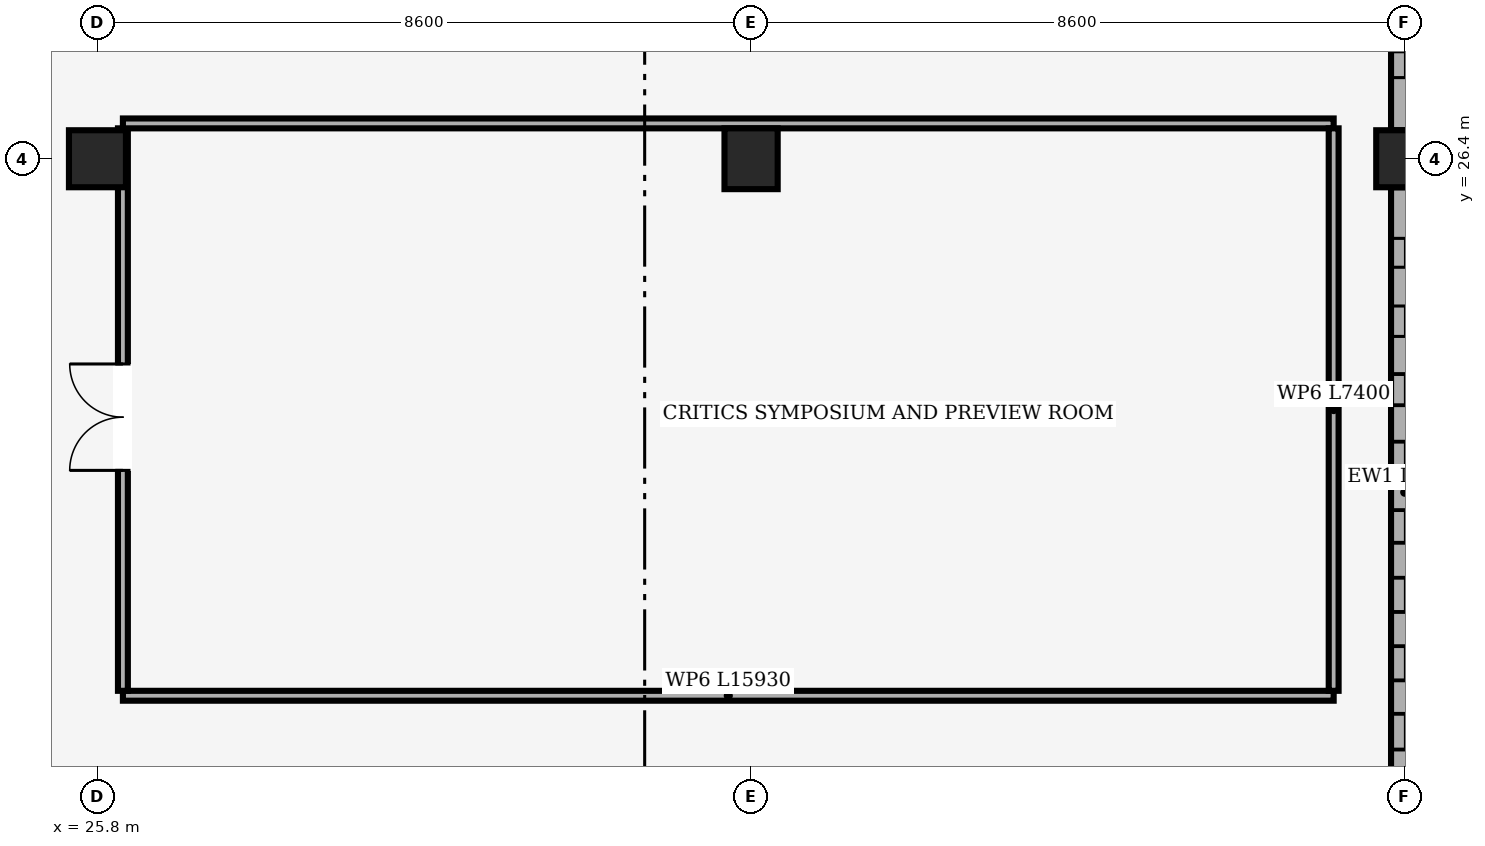
"""IFC4 building model, lengths in metres.
Left out: names, types, materials, properties, quantities, classifications, styles, units other than length and angle.
Written with IfcOpenShell. Run it as: python <this file> out.ifc"""

import sys

from ifc_helpers import new_model, si_unit, direction, frame, frame_2d, origin, origin_2d, place, context, subcontext, project, spatial, rectangle, extrude, element, fill, save


model = new_model("IFC4")
c1 = context("Model", 3, precision=1e-05, world=origin(), true_north=direction((0.0, 1.0)))
c2 = subcontext(c1, "Body", "Model", "MODEL_VIEW")
j1 = project(units=[si_unit("LENGTHUNIT", "METRE"), si_unit("PLANEANGLEUNIT", "RADIAN")], contexts=[c1])
p1 = place(None, origin())
s1 = spatial("IfcSite", under=j1, at=p1, CompositionType="ELEMENT")
p2 = place(p1, origin())
s2 = spatial("IfcBuilding", under=s1, at=p2, CompositionType="ELEMENT")
p3 = place(p2, frame((0.0, 0.0, 12.0)))
s3 = spatial("IfcBuildingStorey", under=s2, at=p3, CompositionType="ELEMENT", Elevation=12.0)
p4 = place(p3, frame((25.8, 26.4, 0.0), z_axis=(0.0, 0.0, 1.0), x_axis=(1.0, 0.0, 0.0)))
e1 = element("IfcColumn", 1, at=p4, inside=s3, PredefinedType="COLUMN", context=c2, shape_type="SweptSolid", body=[
    extrude(rectangle(XDim=0.75, YDim=0.75, at=origin_2d()), origin(), (0.0, 0.0, 1.0), 3.35),
])
p5 = place(p3, frame((34.4, 26.4, 0.0), z_axis=(0.0, 0.0, 1.0), x_axis=(1.0, 0.0, 0.0)))
e2 = element("IfcColumn", 2, at=p5, inside=s3, PredefinedType="COLUMN", context=c2, shape_type="SweptSolid", body=[
    extrude(rectangle(XDim=0.7, YDim=0.8, at=origin_2d()), origin(), (0.0, 0.0, 1.0), 3.35),
])
p6 = place(p3, frame((43.0, 26.4, 0.0), z_axis=(0.0, 0.0, 1.0), x_axis=(1.0, 0.0, 0.0)))
e3 = element("IfcColumn", 3, at=p6, inside=s3, PredefinedType="COLUMN", context=c2, shape_type="SweptSolid", body=[
    extrude(rectangle(XDim=0.75, YDim=0.75, at=origin_2d()), origin(), (0.0, 0.0, 1.0), 3.35),
])
p7 = place(p3, frame((43.0, 34.8, 0.0), z_axis=(0.0, 0.0, 1.0), x_axis=(0.0, -1.0, 0.0)))
e4 = element("IfcWall", 4, at=p7, inside=s3, PredefinedType="SOLIDWALL", context=c2, shape_type="SweptSolid", body=[
    extrude(rectangle(XDim=8.025, YDim=0.36, at=frame_2d((4.013, 0.0))), origin(), (0.0, 0.0, 1.0), 2.735),
])
p8 = place(p7, frame((4.312, 0.0, 1.32)))
e5 = element("IfcOpeningElement", 5, at=p8, cuts=e4, PredefinedType="OPENING", context=c2, shape_type="SweptSolid", body=[
    extrude(rectangle(XDim=0.3, YDim=0.3, at=frame_2d((0.15, 0.15))), frame((0.0, 0.18, 0.0), z_axis=(0.0, -1.0, 0.0), x_axis=(1.0, 0.0, 0.0)), (0.0, 0.0, 1.0), 0.36),
])
p9 = place(p7, frame((5.202, 0.0, 1.32)))
e6 = element("IfcOpeningElement", 6, at=p9, cuts=e4, PredefinedType="OPENING", context=c2, shape_type="SweptSolid", body=[
    extrude(rectangle(XDim=0.32, YDim=0.32, at=frame_2d((0.16, 0.16))), frame((0.0, 0.18, 0.0), z_axis=(0.0, -1.0, 0.0), x_axis=(1.0, 0.0, 0.0)), (0.0, 0.0, 1.0), 0.36),
])
p10 = place(p7, frame((6.992, 0.0, 1.32)))
e7 = element("IfcOpeningElement", 7, at=p10, cuts=e4, PredefinedType="OPENING", context=c2, shape_type="SweptSolid", body=[
    extrude(rectangle(XDim=0.34, YDim=0.34, at=frame_2d((0.17, 0.17))), frame((0.0, 0.18, 0.0), z_axis=(0.0, -1.0, 0.0), x_axis=(1.0, 0.0, 0.0)), (0.0, 0.0, 1.0), 0.36),
])
p11 = place(p3, frame((43.0, 26.025, 0.0), z_axis=(0.0, 0.0, 1.0), x_axis=(0.0, -1.0, 0.0)))
e8 = element("IfcWall", 8, at=p11, inside=s3, PredefinedType="SOLIDWALL", context=c2, shape_type="SweptSolid", body=[
    extrude(rectangle(XDim=8.025, YDim=0.36, at=frame_2d((4.012, 0.0))), origin(), (0.0, 0.0, 1.0), 2.685),
])
p12 = place(p11, frame((0.673, 0.0, 0.42)))
e9 = element("IfcOpeningElement", 9, at=p12, cuts=e8, PredefinedType="OPENING", context=c2, shape_type="SweptSolid", body=[
    extrude(rectangle(XDim=0.38, YDim=0.38, at=frame_2d((0.19, 0.19))), frame((0.0, 0.18, 0.0), z_axis=(0.0, -1.0, 0.0), x_axis=(1.0, 0.0, 0.0)), (0.0, 0.0, 1.0), 0.36),
])
p13 = place(p11, frame((1.562, 0.0, 1.32)))
e10 = element("IfcOpeningElement", 10, at=p13, cuts=e8, PredefinedType="OPENING", context=c2, shape_type="SweptSolid", body=[
    extrude(rectangle(XDim=0.4, YDim=0.4, at=frame_2d((0.2, 0.2))), frame((0.0, 0.18, 0.0), z_axis=(0.0, -1.0, 0.0), x_axis=(1.0, 0.0, 0.0)), (0.0, 0.0, 1.0), 0.36),
])
p14 = place(p11, frame((2.462, 0.0, 0.42)))
e11 = element("IfcOpeningElement", 11, at=p14, cuts=e8, PredefinedType="OPENING", context=c2, shape_type="SweptSolid", body=[
    extrude(rectangle(XDim=0.4, YDim=0.4, at=frame_2d((0.2, 0.2))), frame((0.0, 0.18, 0.0), z_axis=(0.0, -1.0, 0.0), x_axis=(1.0, 0.0, 0.0)), (0.0, 0.0, 1.0), 0.36),
])
p15 = place(p11, frame((2.452, 0.0, 1.32)))
e12 = element("IfcOpeningElement", 12, at=p15, cuts=e8, PredefinedType="OPENING", context=c2, shape_type="SweptSolid", body=[
    extrude(rectangle(XDim=0.42, YDim=0.42, at=frame_2d((0.21, 0.21))), frame((0.0, 0.18, 0.0), z_axis=(0.0, -1.0, 0.0), x_axis=(1.0, 0.0, 0.0)), (0.0, 0.0, 1.0), 0.36),
])
p16 = place(p11, frame((3.353, 0.0, 0.42)))
e13 = element("IfcOpeningElement", 13, at=p16, cuts=e8, PredefinedType="OPENING", context=c2, shape_type="SweptSolid", body=[
    extrude(rectangle(XDim=0.42, YDim=0.42, at=frame_2d((0.21, 0.21))), frame((0.0, 0.18, 0.0), z_axis=(0.0, -1.0, 0.0), x_axis=(1.0, 0.0, 0.0)), (0.0, 0.0, 1.0), 0.36),
])
p17 = place(p11, frame((3.343, 0.0, 1.32)))
e14 = element("IfcOpeningElement", 14, at=p17, cuts=e8, PredefinedType="OPENING", context=c2, shape_type="SweptSolid", body=[
    extrude(rectangle(XDim=0.44, YDim=0.44, at=frame_2d((0.22, 0.22))), frame((0.0, 0.18, 0.0), z_axis=(0.0, -1.0, 0.0), x_axis=(1.0, 0.0, 0.0)), (0.0, 0.0, 1.0), 0.36),
])
p18 = place(p11, frame((4.252, 0.0, 0.42)))
e15 = element("IfcOpeningElement", 15, at=p18, cuts=e8, PredefinedType="OPENING", context=c2, shape_type="SweptSolid", body=[
    extrude(rectangle(XDim=0.42, YDim=0.42, at=frame_2d((0.21, 0.21))), frame((0.0, 0.18, 0.0), z_axis=(0.0, -1.0, 0.0), x_axis=(1.0, 0.0, 0.0)), (0.0, 0.0, 1.0), 0.36),
])
p19 = place(p11, frame((4.242, 0.0, 1.32)))
e16 = element("IfcOpeningElement", 16, at=p19, cuts=e8, PredefinedType="OPENING", context=c2, shape_type="SweptSolid", body=[
    extrude(rectangle(XDim=0.44, YDim=0.44, at=frame_2d((0.22, 0.22))), frame((0.0, 0.18, 0.0), z_axis=(0.0, -1.0, 0.0), x_axis=(1.0, 0.0, 0.0)), (0.0, 0.0, 1.0), 0.36),
])
p20 = place(p11, frame((5.143, 0.0, 0.42)))
e17 = element("IfcOpeningElement", 17, at=p20, cuts=e8, PredefinedType="OPENING", context=c2, shape_type="SweptSolid", body=[
    extrude(rectangle(XDim=0.44, YDim=0.44, at=frame_2d((0.22, 0.22))), frame((0.0, 0.18, 0.0), z_axis=(0.0, -1.0, 0.0), x_axis=(1.0, 0.0, 0.0)), (0.0, 0.0, 1.0), 0.36),
])
p21 = place(p11, frame((5.133, 0.0, 1.32)))
e18 = element("IfcOpeningElement", 18, at=p21, cuts=e8, PredefinedType="OPENING", context=c2, shape_type="SweptSolid", body=[
    extrude(rectangle(XDim=0.46, YDim=0.46, at=frame_2d((0.23, 0.23))), frame((0.0, 0.18, 0.0), z_axis=(0.0, -1.0, 0.0), x_axis=(1.0, 0.0, 0.0)), (0.0, 0.0, 1.0), 0.36),
])
p22 = place(p11, frame((6.042, 0.0, 0.42)))
e19 = element("IfcOpeningElement", 19, at=p22, cuts=e8, PredefinedType="OPENING", context=c2, shape_type="SweptSolid", body=[
    extrude(rectangle(XDim=0.44, YDim=0.44, at=frame_2d((0.22, 0.22))), frame((0.0, 0.18, 0.0), z_axis=(0.0, -1.0, 0.0), x_axis=(1.0, 0.0, 0.0)), (0.0, 0.0, 1.0), 0.36),
])
p23 = place(p11, frame((6.032, 0.0, 1.32)))
e20 = element("IfcOpeningElement", 20, at=p23, cuts=e8, PredefinedType="OPENING", context=c2, shape_type="SweptSolid", body=[
    extrude(rectangle(XDim=0.46, YDim=0.46, at=frame_2d((0.23, 0.23))), frame((0.0, 0.18, 0.0), z_axis=(0.0, -1.0, 0.0), x_axis=(1.0, 0.0, 0.0)), (0.0, 0.0, 1.0), 0.36),
])
p24 = place(p11, frame((6.933, 0.0, 0.42)))
e21 = element("IfcOpeningElement", 21, at=p24, cuts=e8, PredefinedType="OPENING", context=c2, shape_type="SweptSolid", body=[
    extrude(rectangle(XDim=0.46, YDim=0.46, at=frame_2d((0.23, 0.23))), frame((0.0, 0.18, 0.0), z_axis=(0.0, -1.0, 0.0), x_axis=(1.0, 0.0, 0.0)), (0.0, 0.0, 1.0), 0.36),
])
p25 = place(p11, frame((6.923, 0.0, 1.32)))
e22 = element("IfcOpeningElement", 22, at=p25, cuts=e8, PredefinedType="OPENING", context=c2, shape_type="SweptSolid", body=[
    extrude(rectangle(XDim=0.48, YDim=0.48, at=frame_2d((0.24, 0.24))), frame((0.0, 0.18, 0.0), z_axis=(0.0, -1.0, 0.0), x_axis=(1.0, 0.0, 0.0)), (0.0, 0.0, 1.0), 0.36),
])
p26 = place(p3, frame((42.065, 19.335, 0.0), z_axis=(0.0, 0.0, 1.0), x_axis=(-1.0, 0.0, 0.0)))
e23 = element("IfcWall", 23, at=p26, inside=s3, PredefinedType="PARTITIONING", context=c2, shape_type="SweptSolid", body=[
    extrude(rectangle(XDim=15.93, YDim=0.13, at=frame_2d((7.965, 0.0))), origin(), (0.0, 0.0, 1.0), 3.33),
])
p27 = place(p3, frame((26.135, 19.4, 0.0), z_axis=(0.0, 0.0, 1.0), x_axis=(0.0, 1.0, 0.0)))
e24 = element("IfcWall", 24, at=p27, inside=s3, PredefinedType="PARTITIONING", context=c2, shape_type="SweptSolid", body=[
    extrude(rectangle(XDim=7.4, YDim=0.13, at=frame_2d((3.7, 0.0))), origin(), (0.0, 0.0, 1.0), 2.73),
])
p28 = place(p27, frame((2.9, 0.0, 0.0)))
e25 = element("IfcOpeningElement", 25, at=p28, cuts=e24, PredefinedType="OPENING", context=c2, shape_type="SweptSolid", body=[
    extrude(rectangle(XDim=1.4, YDim=2.15, at=frame_2d((0.7, 1.075))), frame((0.0, 0.065, 0.0), z_axis=(0.0, -1.0, 0.0), x_axis=(1.0, 0.0, 0.0)), (0.0, 0.0, 1.0), 0.13),
])
p29 = place(p3, frame((26.135, 26.865, 0.0), z_axis=(0.0, 0.0, 1.0), x_axis=(1.0, 0.0, 0.0)))
e26 = element("IfcWall", 26, at=p29, inside=s3, PredefinedType="PARTITIONING", context=c2, shape_type="SweptSolid", body=[
    extrude(rectangle(XDim=15.93, YDim=0.13, at=frame_2d((7.965, 0.0))), origin(), (0.0, 0.0, 1.0), 2.63),
])
p30 = place(p3, frame((42.065, 26.8, 0.0), z_axis=(0.0, 0.0, 1.0), x_axis=(0.0, -1.0, 0.0)))
e27 = element("IfcWall", 27, at=p30, inside=s3, PredefinedType="PARTITIONING", context=c2, shape_type="SweptSolid", body=[
    extrude(rectangle(XDim=7.4, YDim=0.13, at=frame_2d((3.7, 0.0))), origin(), (0.0, 0.0, 1.0), 3.33),
])
p31 = place(p10, origin())
e28 = element("IfcWindow", 28, at=p31, inside=s3, PartitioningType="SINGLE_PANEL", PredefinedType="WINDOW", context=c2, shape_type="SweptSolid", body=[
    extrude(rectangle(XDim=0.34, YDim=0.34, at=frame_2d((0.17, 0.17))), frame((0.0, -0.07, 0.0), z_axis=(0.0, -1.0, 0.0), x_axis=(1.0, 0.0, 0.0)), (0.0, 0.0, 1.0), 0.06),
])
fill(e7, e28)
p32 = place(p12, origin())
e29 = element("IfcWindow", 29, at=p32, inside=s3, PartitioningType="SINGLE_PANEL", PredefinedType="WINDOW", context=c2, shape_type="SweptSolid", body=[
    extrude(rectangle(XDim=0.38, YDim=0.38, at=frame_2d((0.19, 0.19))), frame((0.0, -0.07, 0.0), z_axis=(0.0, -1.0, 0.0), x_axis=(1.0, 0.0, 0.0)), (0.0, 0.0, 1.0), 0.06),
])
fill(e9, e29)
p33 = place(p13, origin())
e30 = element("IfcWindow", 30, at=p33, inside=s3, PartitioningType="SINGLE_PANEL", PredefinedType="WINDOW", context=c2, shape_type="SweptSolid", body=[
    extrude(rectangle(XDim=0.4, YDim=0.4, at=frame_2d((0.2, 0.2))), frame((0.0, -0.07, 0.0), z_axis=(0.0, -1.0, 0.0), x_axis=(1.0, 0.0, 0.0)), (0.0, 0.0, 1.0), 0.06),
])
fill(e10, e30)
p34 = place(p14, origin())
e31 = element("IfcWindow", 31, at=p34, inside=s3, PartitioningType="SINGLE_PANEL", PredefinedType="WINDOW", context=c2, shape_type="SweptSolid", body=[
    extrude(rectangle(XDim=0.4, YDim=0.4, at=frame_2d((0.2, 0.2))), frame((0.0, -0.07, 0.0), z_axis=(0.0, -1.0, 0.0), x_axis=(1.0, 0.0, 0.0)), (0.0, 0.0, 1.0), 0.06),
])
fill(e11, e31)
p35 = place(p15, origin())
e32 = element("IfcWindow", 32, at=p35, inside=s3, PartitioningType="SINGLE_PANEL", PredefinedType="WINDOW", context=c2, shape_type="SweptSolid", body=[
    extrude(rectangle(XDim=0.42, YDim=0.42, at=frame_2d((0.21, 0.21))), frame((0.0, -0.07, 0.0), z_axis=(0.0, -1.0, 0.0), x_axis=(1.0, 0.0, 0.0)), (0.0, 0.0, 1.0), 0.06),
])
fill(e12, e32)
p36 = place(p16, origin())
e33 = element("IfcWindow", 33, at=p36, inside=s3, PartitioningType="SINGLE_PANEL", PredefinedType="WINDOW", context=c2, shape_type="SweptSolid", body=[
    extrude(rectangle(XDim=0.42, YDim=0.42, at=frame_2d((0.21, 0.21))), frame((0.0, -0.07, 0.0), z_axis=(0.0, -1.0, 0.0), x_axis=(1.0, 0.0, 0.0)), (0.0, 0.0, 1.0), 0.06),
])
fill(e13, e33)
p37 = place(p17, origin())
e34 = element("IfcWindow", 34, at=p37, inside=s3, PartitioningType="SINGLE_PANEL", PredefinedType="WINDOW", context=c2, shape_type="SweptSolid", body=[
    extrude(rectangle(XDim=0.44, YDim=0.44, at=frame_2d((0.22, 0.22))), frame((0.0, -0.07, 0.0), z_axis=(0.0, -1.0, 0.0), x_axis=(1.0, 0.0, 0.0)), (0.0, 0.0, 1.0), 0.06),
])
fill(e14, e34)
p38 = place(p18, origin())
e35 = element("IfcWindow", 35, at=p38, inside=s3, PartitioningType="SINGLE_PANEL", PredefinedType="WINDOW", context=c2, shape_type="SweptSolid", body=[
    extrude(rectangle(XDim=0.42, YDim=0.42, at=frame_2d((0.21, 0.21))), frame((0.0, -0.07, 0.0), z_axis=(0.0, -1.0, 0.0), x_axis=(1.0, 0.0, 0.0)), (0.0, 0.0, 1.0), 0.06),
])
fill(e15, e35)
p39 = place(p19, origin())
e36 = element("IfcWindow", 36, at=p39, inside=s3, PartitioningType="SINGLE_PANEL", PredefinedType="WINDOW", context=c2, shape_type="SweptSolid", body=[
    extrude(rectangle(XDim=0.44, YDim=0.44, at=frame_2d((0.22, 0.22))), frame((0.0, -0.07, 0.0), z_axis=(0.0, -1.0, 0.0), x_axis=(1.0, 0.0, 0.0)), (0.0, 0.0, 1.0), 0.06),
])
fill(e16, e36)
p40 = place(p20, origin())
e37 = element("IfcWindow", 37, at=p40, inside=s3, PartitioningType="SINGLE_PANEL", PredefinedType="WINDOW", context=c2, shape_type="SweptSolid", body=[
    extrude(rectangle(XDim=0.44, YDim=0.44, at=frame_2d((0.22, 0.22))), frame((0.0, -0.07, 0.0), z_axis=(0.0, -1.0, 0.0), x_axis=(1.0, 0.0, 0.0)), (0.0, 0.0, 1.0), 0.06),
])
fill(e17, e37)
p41 = place(p21, origin())
e38 = element("IfcWindow", 38, at=p41, inside=s3, PartitioningType="SINGLE_PANEL", PredefinedType="WINDOW", context=c2, shape_type="SweptSolid", body=[
    extrude(rectangle(XDim=0.46, YDim=0.46, at=frame_2d((0.23, 0.23))), frame((0.0, -0.07, 0.0), z_axis=(0.0, -1.0, 0.0), x_axis=(1.0, 0.0, 0.0)), (0.0, 0.0, 1.0), 0.06),
])
fill(e18, e38)
p42 = place(p22, origin())
e39 = element("IfcWindow", 39, at=p42, inside=s3, PartitioningType="SINGLE_PANEL", PredefinedType="WINDOW", context=c2, shape_type="SweptSolid", body=[
    extrude(rectangle(XDim=0.44, YDim=0.44, at=frame_2d((0.22, 0.22))), frame((0.0, -0.07, 0.0), z_axis=(0.0, -1.0, 0.0), x_axis=(1.0, 0.0, 0.0)), (0.0, 0.0, 1.0), 0.06),
])
fill(e19, e39)
p43 = place(p23, origin())
e40 = element("IfcWindow", 40, at=p43, inside=s3, PartitioningType="SINGLE_PANEL", PredefinedType="WINDOW", context=c2, shape_type="SweptSolid", body=[
    extrude(rectangle(XDim=0.46, YDim=0.46, at=frame_2d((0.23, 0.23))), frame((0.0, -0.07, 0.0), z_axis=(0.0, -1.0, 0.0), x_axis=(1.0, 0.0, 0.0)), (0.0, 0.0, 1.0), 0.06),
])
fill(e20, e40)
p44 = place(p24, origin())
e41 = element("IfcWindow", 41, at=p44, inside=s3, PartitioningType="SINGLE_PANEL", PredefinedType="WINDOW", context=c2, shape_type="SweptSolid", body=[
    extrude(rectangle(XDim=0.46, YDim=0.46, at=frame_2d((0.23, 0.23))), frame((0.0, -0.07, 0.0), z_axis=(0.0, -1.0, 0.0), x_axis=(1.0, 0.0, 0.0)), (0.0, 0.0, 1.0), 0.06),
])
fill(e21, e41)
p45 = place(p25, origin())
e42 = element("IfcWindow", 42, at=p45, inside=s3, PartitioningType="SINGLE_PANEL", PredefinedType="WINDOW", context=c2, shape_type="SweptSolid", body=[
    extrude(rectangle(XDim=0.48, YDim=0.48, at=frame_2d((0.24, 0.24))), frame((0.0, -0.07, 0.0), z_axis=(0.0, -1.0, 0.0), x_axis=(1.0, 0.0, 0.0)), (0.0, 0.0, 1.0), 0.06),
])
fill(e22, e42)
p46 = place(p28, origin())
e43 = element("IfcDoor", 43, at=p46, inside=s3, OperationType="DOUBLE_DOOR_SINGLE_SWING", PredefinedType="DOOR", context=c2, shape_type="SweptSolid", body=[
    extrude(rectangle(XDim=1.4, YDim=2.15, at=frame_2d((0.7, 1.075))), frame((0.0, 0.025, 0.0), z_axis=(0.0, -1.0, 0.0), x_axis=(1.0, 0.0, 0.0)), (0.0, 0.0, 1.0), 0.05),
])
fill(e25, e43)
save(model, sys.argv[1])
